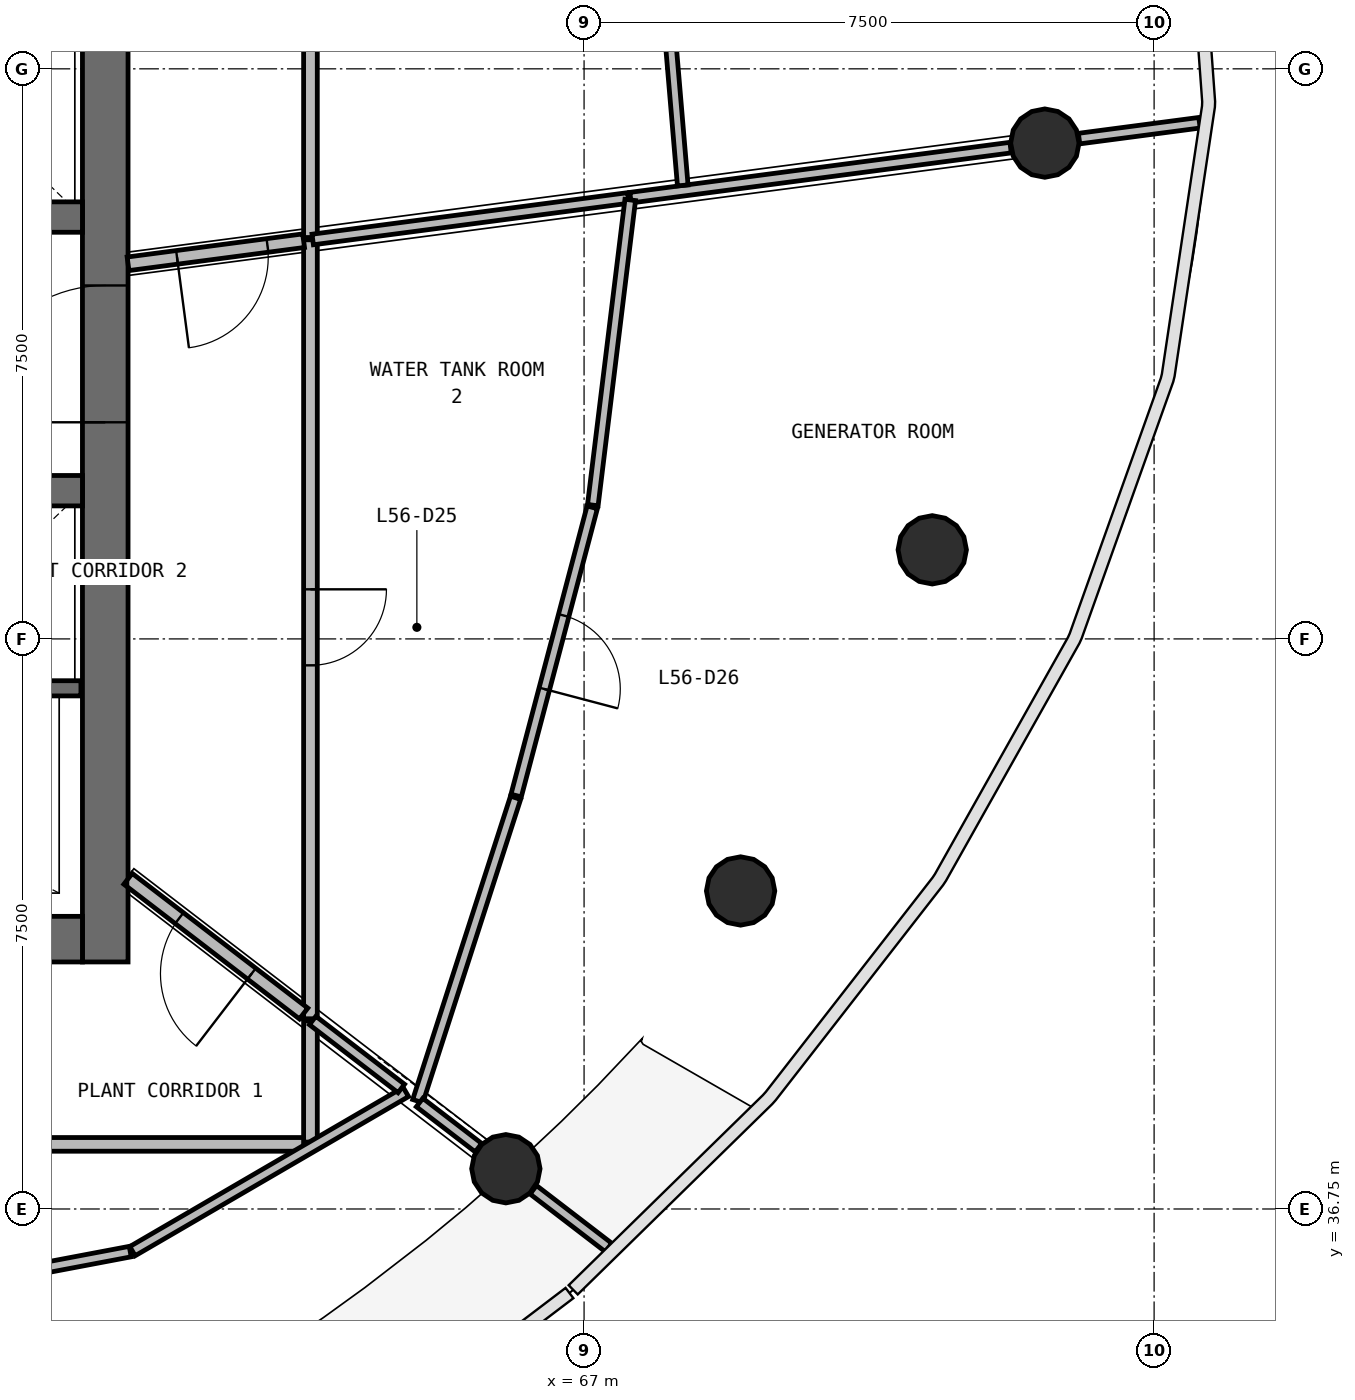
"""IFC4 building model, lengths in metres.
Left out: names, types, materials, properties, quantities, classifications, styles, units other than length and angle.
Written with IfcOpenShell. Run it as: python <this file> out.ifc"""

import sys

from ifc_helpers import new_model, si_unit, direction, frame, frame_2d, origin, origin_2d, place, context, subcontext, project, spatial, rectangle, circle, extrude, source, transform, mapped, element, fill, save


model = new_model("IFC4")
c1 = context("Model", 3, precision=1e-05, world=origin(), true_north=direction((0.0, 1.0)))
c2 = subcontext(c1, "Body", "Model", "MODEL_VIEW")
j1 = project(units=[si_unit("LENGTHUNIT", "METRE"), si_unit("PLANEANGLEUNIT", "RADIAN")], contexts=[c1])
p1 = place(None, origin())
s1 = spatial("IfcSite", under=j1, at=p1, CompositionType="ELEMENT")
p2 = place(p1, origin())
s2 = spatial("IfcBuilding", under=s1, at=p2, CompositionType="ELEMENT")
p3 = place(p2, frame((0.0, 0.0, 230.6)))
s3 = spatial("IfcBuildingStorey", under=s2, at=p3, CompositionType="ELEMENT", Elevation=230.6)
p4 = place(p3, frame((60.7, 40.0, 0.0), z_axis=(0.0, 0.0, 1.0), x_axis=(0.0, 1.0, 0.0)))
e1 = element("IfcWall", 1, at=p4, inside=s3, PredefinedType="SHEAR", context=c2, shape_type="SweptSolid", body=[
    extrude(rectangle(XDim=16.0, YDim=0.6, at=frame_2d((8.0, 0.0))), origin(), (0.0, 0.0, 1.0), 3.9),
])
p5 = place(p4, frame((7.1, 0.0, 0.0)))
e2 = element("IfcOpeningElement", 2, at=p5, cuts=e1, PredefinedType="OPENING", context=c2, shape_type="SweptSolid", body=[
    extrude(rectangle(XDim=1.8, YDim=2.1, at=frame_2d((0.9, 1.05))), frame((0.0, 0.31, 0.0), z_axis=(0.0, -1.0, 0.0), x_axis=(1.0, 0.0, 0.0)), (0.0, 0.0, 1.0), 0.62),
])
p6 = place(p3, frame((43.6, 40.3, 0.0), z_axis=(0.0, 0.0, 1.0), x_axis=(1.0, 0.0, 0.0)))
e3 = element("IfcWall", 3, at=p6, inside=s3, PredefinedType="SHEAR", context=c2, shape_type="SweptSolid", body=[
    extrude(rectangle(XDim=16.8, YDim=0.6, at=frame_2d((8.4, 0.0))), origin(), (0.0, 0.0, 1.0), 3.9),
])
p7 = place(p6, frame((10.3, 0.0, 0.0)))
e4 = element("IfcOpeningElement", 4, at=p7, cuts=e3, PredefinedType="OPENING", context=c2, shape_type="SweptSolid", body=[
    extrude(rectangle(XDim=1.2, YDim=2.1, at=frame_2d((0.6, 1.05))), frame((0.0, 0.31, 0.0), z_axis=(0.0, -1.0, 0.0), x_axis=(1.0, 0.0, 0.0)), (0.0, 0.0, 1.0), 0.62),
])
p8 = place(p6, frame((7.25, 0.0, 0.0)))
e5 = element("IfcOpeningElement", 5, at=p8, cuts=e3, PredefinedType="OPENING", context=c2, shape_type="SweptSolid", body=[
    extrude(rectangle(XDim=1.1, YDim=2.1, at=frame_2d((0.55, 1.05))), frame((0.0, 0.31, 0.0), z_axis=(0.0, -1.0, 0.0), x_axis=(1.0, 0.0, 0.0)), (0.0, 0.0, 1.0), 0.62),
])
p9 = place(p6, frame((0.7, 0.0, 0.0)))
e6 = element("IfcOpeningElement", 6, at=p9, cuts=e3, PredefinedType="OPENING", context=c2, shape_type="SweptSolid", body=[
    extrude(rectangle(XDim=0.8, YDim=2.1, at=frame_2d((0.4, 1.05))), frame((0.0, 0.31, 0.0), z_axis=(0.0, -1.0, 0.0), x_axis=(1.0, 0.0, 0.0)), (0.0, 0.0, 1.0), 0.62),
])
p10 = place(p3, frame((43.6, 49.8, 0.0), z_axis=(0.0, 0.0, 1.0), x_axis=(1.0, 0.0, 0.0)))
e7 = element("IfcWall", 7, at=p10, inside=s3, PredefinedType="SHEAR", context=c2, shape_type="SweptSolid", body=[
    extrude(rectangle(XDim=16.8, YDim=0.4, at=frame_2d((8.4, 0.0))), origin(), (0.0, 0.0, 1.0), 3.9),
])
p11 = place(p10, frame((4.45, 0.0, 0.0)))
e8 = element("IfcOpeningElement", 8, at=p11, cuts=e7, PredefinedType="OPENING", context=c2, shape_type="SweptSolid", body=[
    extrude(rectangle(XDim=0.9, YDim=2.1, at=frame_2d((0.45, 1.05))), frame((0.0, 0.21, 0.0), z_axis=(0.0, -1.0, 0.0), x_axis=(1.0, 0.0, 0.0)), (0.0, 0.0, 1.0), 0.42),
])
p12 = place(p10, frame((7.85, 0.0, 0.0)))
e9 = element("IfcOpeningElement", 9, at=p12, cuts=e7, PredefinedType="OPENING", context=c2, shape_type="SweptSolid", body=[
    extrude(rectangle(XDim=0.9, YDim=2.1, at=frame_2d((0.45, 1.05))), frame((0.0, 0.21, 0.0), z_axis=(0.0, -1.0, 0.0), x_axis=(1.0, 0.0, 0.0)), (0.0, 0.0, 1.0), 0.42),
])
p13 = place(p3, frame((43.6, 46.2, 0.0), z_axis=(0.0, 0.0, 1.0), x_axis=(1.0, 0.0, 0.0)))
e10 = element("IfcWall", 10, at=p13, inside=s3, PredefinedType="SHEAR", context=c2, shape_type="SweptSolid", body=[
    extrude(rectangle(XDim=16.8, YDim=0.4, at=frame_2d((8.4, 0.0))), origin(), (0.0, 0.0, 1.0), 3.9),
])
p14 = place(p13, frame((7.85, 0.0, 0.0)))
e11 = element("IfcOpeningElement", 11, at=p14, cuts=e10, PredefinedType="OPENING", context=c2, shape_type="SweptSolid", body=[
    extrude(rectangle(XDim=0.9, YDim=2.1, at=frame_2d((0.45, 1.05))), frame((0.0, 0.21, 0.0), z_axis=(0.0, -1.0, 0.0), x_axis=(1.0, 0.0, 0.0)), (0.0, 0.0, 1.0), 0.42),
])
m1 = source(origin(), c2, "Body", "SweptSolid", [
    extrude(circle(Radius=0.45, at=origin_2d()), origin(), (0.0, 0.0, 1.0), 3.58),
])
for number, where, z_axis, x_axis in (
    (12, (73.062, 50.773, 0.0), (0.0, 0.0, 1.0), (1.0, 0.0, 0.0)),
    (13, (65.971, 37.28, 0.0), (0.0, 0.0, 1.0), (1.0, 0.0, 0.0)),
    (14, (69.059, 40.934, 0.0), (0.0, 0.0, 1.0), (1.0, 0.0, 0.0)),
    (15, (71.581, 45.422, 0.0), (0.0, 0.0, 1.0), (1.0, 0.0, 0.0)),
):
    element("IfcColumn", number, at=place(p3, frame(where, z_axis=z_axis, x_axis=x_axis)), inside=s3, PredefinedType="COLUMN", context=c2, shape_type="MappedRepresentation", body=[
        mapped(m1, transform((0.0, 0.0, 0.0), scale=1.0)),
    ])
p15 = place(p3, frame((57.7, 43.6, 0.0), z_axis=(0.0, 0.0, 1.0), x_axis=(1.0, 0.0, 0.0)))
e16 = element("IfcWall", 16, at=p15, inside=s3, PredefinedType="SOLIDWALL", context=c2, shape_type="SweptSolid", body=[
    extrude(rectangle(XDim=2.68, YDim=0.2, at=frame_2d((1.34, 0.0))), origin(), (0.0, 0.0, 1.0), 3.58),
])
p16 = place(p3, frame((63.4, 49.501, 0.0), z_axis=(0.0, 0.0, 1.0), x_axis=(0.0, -1.0, 0.0)))
e17 = element("IfcWall", 17, at=p16, inside=s3, PredefinedType="PARTITIONING", context=c2, shape_type="SweptSolid", body=[
    extrude(rectangle(XDim=10.248, YDim=0.18, at=frame_2d((5.124, 0.0))), origin(), (0.0, 0.0, 1.0), 2.38),
])
p17 = place(p16, frame((4.598, 0.0, 0.0)))
e18 = element("IfcOpeningElement", 18, at=p17, cuts=e17, PredefinedType="OPENING", context=c2, shape_type="SweptSolid", body=[
    extrude(rectangle(XDim=1.0, YDim=2.1, at=frame_2d((0.5, 1.05))), frame((0.0, 0.1, 0.0), z_axis=(0.0, -1.0, 0.0), x_axis=(1.0, 0.0, 0.0)), (0.0, 0.0, 1.0), 0.2),
])
p18 = place(p3, frame((63.4, 37.6, 0.0), z_axis=(0.0, 0.0, 1.0), x_axis=(-1.0, 0.0, 0.0)))
e19 = element("IfcWall", 19, at=p18, inside=s3, PredefinedType="PARTITIONING", context=c2, shape_type="SweptSolid", body=[
    extrude(rectangle(XDim=10.031, YDim=0.18, at=frame_2d((5.015, 0.0))), origin(), (0.0, 0.0, 1.0), 2.38),
])
p19 = place(p18, frame((4.581, 0.0, 0.0)))
e20 = element("IfcOpeningElement", 20, at=p19, cuts=e19, PredefinedType="OPENING", context=c2, shape_type="SweptSolid", body=[
    extrude(rectangle(XDim=1.0, YDim=2.1, at=frame_2d((0.5, 1.05))), frame((0.0, 0.1, 0.0), z_axis=(0.0, -1.0, 0.0), x_axis=(1.0, 0.0, 0.0)), (0.0, 0.0, 1.0), 0.2),
])
p20 = place(p3, frame((63.4, 49.531, 0.0), z_axis=(0.0, 0.0, 1.0), x_axis=(0.0, 1.0, 0.0)))
e21 = element("IfcWall", 21, at=p20, inside=s3, PredefinedType="PARTITIONING", context=c2, shape_type="SweptSolid", body=[
    extrude(rectangle(XDim=8.869, YDim=0.18, at=frame_2d((4.435, 0.0))), origin(), (0.0, 0.0, 1.0), 2.38),
])
p21 = place(p3, frame((63.31, 39.322, 0.0), z_axis=(0.0, 0.0, 1.0), x_axis=(-0.793371480341, 0.608737787706, 0.0)))
e22 = element("IfcWall", 22, at=p21, inside=s3, PredefinedType="PARTITIONING", context=c2, shape_type="SweptSolid", body=[
    extrude(rectangle(XDim=2.912, YDim=0.18, at=frame_2d((1.456, 0.0))), origin(), (0.0, 0.0, 1.0), 2.38),
])
p22 = place(p21, frame((0.862, 0.0, 0.0)))
e23 = element("IfcOpeningElement", 23, at=p22, cuts=e22, PredefinedType="OPENING", context=c2, shape_type="SweptSolid", body=[
    extrude(rectangle(XDim=1.2, YDim=2.1, at=frame_2d((0.6, 1.05))), frame((0.0, 0.1, 0.0), z_axis=(0.0, -1.0, 0.0), x_axis=(1.0, 0.0, 0.0)), (0.0, 0.0, 1.0), 0.2),
])
p23 = place(p3, frame((63.31, 49.489, 0.0), z_axis=(0.0, 0.0, 1.0), x_axis=(-0.991440737811, -0.130557509967, 0.0)))
e24 = element("IfcWall", 24, at=p23, inside=s3, PredefinedType="PARTITIONING", context=c2, shape_type="SweptSolid", body=[
    extrude(rectangle(XDim=2.33, YDim=0.18, at=frame_2d((1.165, 0.0))), origin(), (0.0, 0.0, 1.0), 2.38),
])
p24 = place(p23, frame((0.48, 0.0, 0.0)))
e25 = element("IfcOpeningElement", 25, at=p24, cuts=e24, PredefinedType="OPENING", context=c2, shape_type="SweptSolid", body=[
    extrude(rectangle(XDim=1.2, YDim=2.1, at=frame_2d((0.6, 1.05))), frame((0.0, 0.1, 0.0), z_axis=(0.0, -1.0, 0.0), x_axis=(1.0, 0.0, 0.0)), (0.0, 0.0, 1.0), 0.2),
])
p25 = place(p3, frame((63.4, 37.63, 0.0), z_axis=(0.0, 0.0, 1.0), x_axis=(0.0, 1.0, 0.0)))
e26 = element("IfcWall", 26, at=p25, inside=s3, PredefinedType="PARTITIONING", context=c2, shape_type="SweptSolid", body=[
    extrude(rectangle(XDim=1.593, YDim=0.18, at=frame_2d((0.796, 0.0))), origin(), (0.0, 0.0, 1.0), 2.38),
])
p26 = place(p3, frame((67.611, 50.055, 0.0), z_axis=(0.0, 0.0, 1.0), x_axis=(0.991443419201, 0.130537146143, 0.0)))
e27 = element("IfcWall", 27, at=p26, inside=s3, PredefinedType="PARTITIONING", context=c2, shape_type="SweptSolid", body=[
    extrude(rectangle(XDim=5.044, YDim=0.14, at=frame_2d((2.522, 0.0))), origin(), (0.0, 0.0, 1.0), 2.38),
])
p27 = place(p3, frame((63.43, 49.505, 0.0), z_axis=(0.0, 0.0, 1.0), x_axis=(0.991450524652, 0.130483168137, 0.0)))
e28 = element("IfcWall", 28, at=p27, inside=s3, PredefinedType="PARTITIONING", context=c2, shape_type="SweptSolid", body=[
    extrude(rectangle(XDim=4.188, YDim=0.14, at=frame_2d((2.094, 0.0))), origin(), (0.0, 0.0, 1.0), 2.38),
])
p28 = place(p3, frame((68.298, 50.216, 0.0), z_axis=(0.0, 0.0, 1.0), x_axis=(-0.084308537488, 0.996439697376, 0.0)))
e29 = element("IfcWall", 29, at=p28, inside=s3, PredefinedType="PARTITIONING", context=c2, shape_type="SweptSolid", body=[
    extrude(rectangle(XDim=4.367, YDim=0.14, at=frame_2d((2.184, 0.0))), origin(), (0.0, 0.0, 1.0), 2.38),
])
p29 = place(p3, frame((64.812, 38.169, 0.0), z_axis=(0.0, 0.0, 1.0), x_axis=(0.306815660153, 0.951768958668, 0.0)))
e30 = element("IfcWall", 30, at=p29, inside=s3, PredefinedType="PARTITIONING", context=c2, shape_type="SweptSolid", body=[
    extrude(rectangle(XDim=4.193, YDim=0.14, at=frame_2d((2.097, 0.0))), origin(), (0.0, 0.0, 1.0), 2.38),
])
p30 = place(p3, frame((61.058, 36.195, 0.0), z_axis=(0.0, 0.0, 1.0), x_axis=(0.864208311026, 0.503134172118, 0.0)))
e31 = element("IfcWall", 31, at=p30, inside=s3, PredefinedType="PARTITIONING", context=c2, shape_type="SweptSolid", body=[
    extrude(rectangle(XDim=4.162, YDim=0.14, at=frame_2d((2.081, 0.0))), origin(), (0.0, 0.0, 1.0), 2.38),
])
p31 = place(p3, frame((67.115, 46.01, 0.0), z_axis=(0.0, 0.0, 1.0), x_axis=(0.121724415308, 0.992563935834, 0.0)))
e32 = element("IfcWall", 32, at=p31, inside=s3, PredefinedType="PARTITIONING", context=c2, shape_type="SweptSolid", body=[
    extrude(rectangle(XDim=4.045, YDim=0.14, at=frame_2d((2.023, 0.0))), origin(), (0.0, 0.0, 1.0), 2.38),
])
p32 = place(p3, frame((67.107, 45.981, 0.0), z_axis=(0.0, 0.0, 1.0), x_axis=(-0.255286819114, -0.966865368077, 0.0)))
e33 = element("IfcWall", 33, at=p32, inside=s3, PredefinedType="PARTITIONING", context=c2, shape_type="SweptSolid", body=[
    extrude(rectangle(XDim=3.922, YDim=0.14, at=frame_2d((1.961, 0.0))), origin(), (0.0, 0.0, 1.0), 2.38),
])
p33 = place(p32, frame((1.472, 0.0, 0.0)))
e34 = element("IfcOpeningElement", 34, at=p33, cuts=e33, PredefinedType="OPENING", context=c2, shape_type="SweptSolid", body=[
    extrude(rectangle(XDim=1.0, YDim=2.1, at=frame_2d((0.5, 1.05))), frame((0.0, 0.08, 0.0), z_axis=(0.0, -1.0, 0.0), x_axis=(1.0, 0.0, 0.0)), (0.0, 0.0, 1.0), 0.16),
])
p34 = place(p3, frame((61.029, 36.189, 0.0), z_axis=(0.0, 0.0, 1.0), x_axis=(-0.982553571564, -0.185979781176, 0.0)))
e35 = element("IfcWall", 35, at=p34, inside=s3, PredefinedType="PARTITIONING", context=c2, shape_type="SweptSolid", body=[
    extrude(rectangle(XDim=3.904, YDim=0.14, at=frame_2d((1.952, 0.0))), origin(), (0.0, 0.0, 1.0), 2.38),
])
p35 = place(p34, frame((1.454, 0.0, 0.0)))
e36 = element("IfcOpeningElement", 36, at=p35, cuts=e35, PredefinedType="OPENING", context=c2, shape_type="SweptSolid", body=[
    extrude(rectangle(XDim=1.0, YDim=2.1, at=frame_2d((0.5, 1.05))), frame((0.0, 0.08, 0.0), z_axis=(0.0, -1.0, 0.0), x_axis=(1.0, 0.0, 0.0)), (0.0, 0.0, 1.0), 0.16),
])
p36 = place(p3, frame((63.429, 39.23, 0.0), z_axis=(0.0, 0.0, 1.0), x_axis=(0.793395131444, -0.608706961847, 0.0)))
e37 = element("IfcWall", 37, at=p36, inside=s3, PredefinedType="PARTITIONING", context=c2, shape_type="SweptSolid", body=[
    extrude(rectangle(XDim=1.47, YDim=0.14, at=frame_2d((0.735, 0.0))), origin(), (0.0, 0.0, 1.0), 2.38),
])
p37 = place(p3, frame((73.513, 50.832, 0.0), z_axis=(0.0, 0.0, 1.0), x_axis=(0.991448052913, 0.130501947779, 0.0)))
e38 = element("IfcWall", 38, at=p37, inside=s3, PredefinedType="PARTITIONING", context=c2, shape_type="SweptSolid", body=[
    extrude(rectangle(XDim=1.598, YDim=0.14, at=frame_2d((0.799, 0.0))), origin(), (0.0, 0.0, 1.0), 2.88),
])
p38 = place(p3, frame((66.332, 37.003, 0.0), z_axis=(0.0, 0.0, 1.0), x_axis=(0.793408114576, -0.608690039121, 0.0)))
e39 = element("IfcWall", 39, at=p38, inside=s3, PredefinedType="PARTITIONING", context=c2, shape_type="SweptSolid", body=[
    extrude(rectangle(XDim=1.249, YDim=0.14, at=frame_2d((0.625, 0.0))), origin(), (0.0, 0.0, 1.0), 2.88),
])
p39 = place(p3, frame((64.836, 38.151, 0.0), z_axis=(0.0, 0.0, 1.0), x_axis=(0.793348654177, -0.608767536023, 0.0)))
e40 = element("IfcWall", 40, at=p39, inside=s3, PredefinedType="PARTITIONING", context=c2, shape_type="SweptSolid", body=[
    extrude(rectangle(XDim=0.976, YDim=0.14, at=frame_2d((0.488, 0.0))), origin(), (0.0, 0.0, 1.0), 2.38),
])
m2 = source(origin(), c2, "Body", "SweptSolid", [
    extrude(rectangle(XDim=1.8, YDim=2.1, at=frame_2d((0.9, 1.05))), frame((0.0, 0.025, 0.0), z_axis=(0.0, -1.0, 0.0), x_axis=(1.0, 0.0, 0.0)), (0.0, 0.0, 1.0), 0.05),
])
p40 = place(p5, origin())
e41 = element("IfcDoor", 41, at=p40, inside=s3, OperationType="SINGLE_SWING_LEFT", PredefinedType="DOOR", context=c2, shape_type="MappedRepresentation", body=[
    mapped(m2, transform((0.0, 0.0, 0.0), scale=1.0)),
])
fill(e2, e41)
m3 = source(origin(), c2, "Body", "SweptSolid", [
    extrude(rectangle(XDim=1.0, YDim=2.1, at=frame_2d((0.5, 1.05))), frame((0.0, 0.025, 0.0), z_axis=(0.0, -1.0, 0.0), x_axis=(1.0, 0.0, 0.0)), (0.0, 0.0, 1.0), 0.05),
])
p41 = place(p17, origin())
e42 = element("IfcDoor", 42, at=p41, inside=s3, OperationType="SINGLE_SWING_LEFT", PredefinedType="DOOR", context=c2, shape_type="MappedRepresentation", body=[
    mapped(m3, transform((0.0, 0.0, 0.0), scale=1.0)),
])
fill(e18, e42)
p42 = place(p33, origin())
e43 = element("IfcDoor", 43, at=p42, inside=s3, OperationType="SINGLE_SWING_RIGHT", PredefinedType="DOOR", context=c2, shape_type="MappedRepresentation", body=[
    mapped(m3, transform((0.0, 0.0, 0.0), scale=1.0)),
])
fill(e34, e43)
m4 = source(origin(), c2, "Body", "SweptSolid", [
    extrude(rectangle(XDim=1.2, YDim=2.1, at=frame_2d((0.6, 1.05))), frame((0.0, 0.025, 0.0), z_axis=(0.0, -1.0, 0.0), x_axis=(1.0, 0.0, 0.0)), (0.0, 0.0, 1.0), 0.05),
])
p43 = place(p22, origin())
e44 = element("IfcDoor", 44, at=p43, inside=s3, OperationType="SINGLE_SWING_LEFT", PredefinedType="DOOR", context=c2, shape_type="MappedRepresentation", body=[
    mapped(m4, transform((0.0, 0.0, 0.0), scale=1.0)),
])
fill(e23, e44)
p44 = place(p24, origin())
e45 = element("IfcDoor", 45, at=p44, inside=s3, OperationType="SINGLE_SWING_RIGHT", PredefinedType="DOOR", context=c2, shape_type="MappedRepresentation", body=[
    mapped(m4, transform((0.0, 0.0, 0.0), scale=1.0)),
])
fill(e25, e45)
save(model, sys.argv[1])
